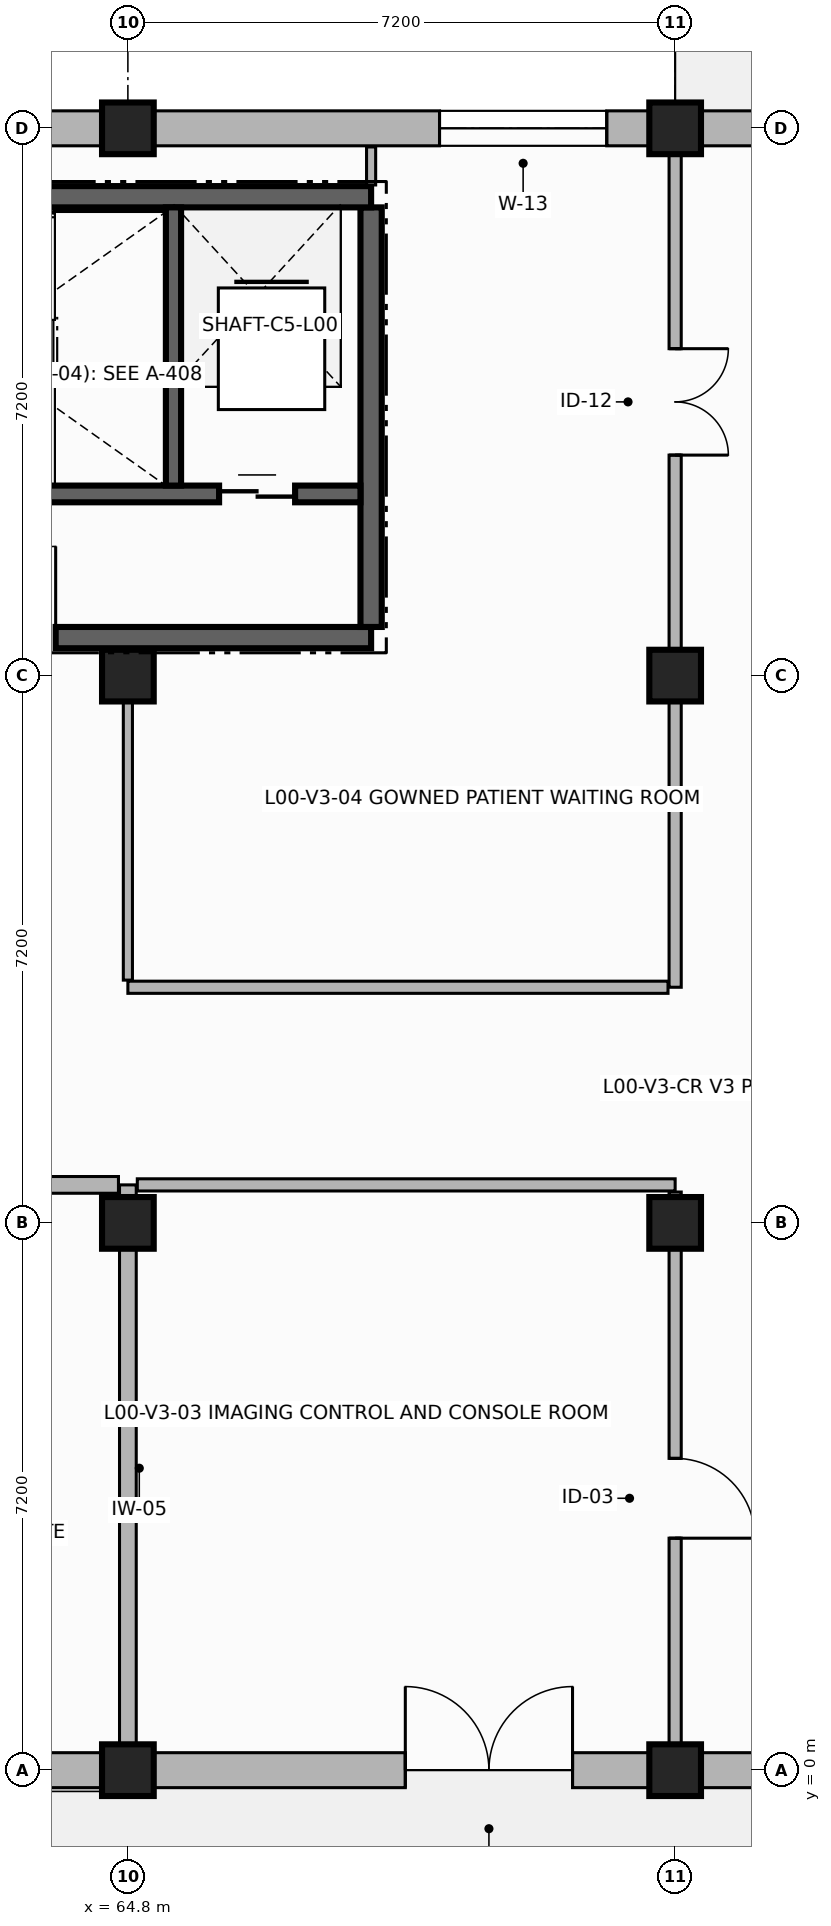
"""IFC4 building model, lengths in metres.
Left out: names, types, materials, properties, quantities, classifications, styles, units other than length and angle.
Written with IfcOpenShell. Run it as: python <this file> out.ifc"""

import sys

from ifc_helpers import new_model, si_unit, direction, frame, frame_2d, origin, origin_2d, place, context, subcontext, project, spatial, rectangle, extrude, element, fill, save


model = new_model("IFC4")
c1 = context("Model", 3, precision=1e-05, world=origin(), true_north=direction((0.0, 1.0)))
c2 = subcontext(c1, "Body", "Model", "MODEL_VIEW")
j1 = project(units=[si_unit("LENGTHUNIT", "METRE"), si_unit("PLANEANGLEUNIT", "RADIAN")], contexts=[c1])
p1 = place(None, origin())
s1 = spatial("IfcSite", under=j1, at=p1, CompositionType="ELEMENT")
p2 = place(p1, origin())
s2 = spatial("IfcBuilding", under=s1, at=p2, CompositionType="ELEMENT")
p3 = place(p2, origin())
s3 = spatial("IfcBuildingStorey", under=s2, at=p3, CompositionType="ELEMENT", Elevation=0.0)
for number, where, z_axis, x_axis in (
    (1, (64.8, 0.0, 0.0), (0.0, 0.0, 1.0), (1.0, 0.0, 0.0)),
    (2, (64.8, 7.2, 0.0), (0.0, 0.0, 1.0), (1.0, 0.0, 0.0)),
    (3, (64.8, 14.4, 0.0), (0.0, 0.0, 1.0), (1.0, 0.0, 0.0)),
    (4, (64.8, 21.6, 0.0), (0.0, 0.0, 1.0), (1.0, 0.0, 0.0)),
    (5, (72.0, 0.0, 0.0), (0.0, 0.0, 1.0), (1.0, 0.0, 0.0)),
    (6, (72.0, 7.2, 0.0), (0.0, 0.0, 1.0), (1.0, 0.0, 0.0)),
    (7, (72.0, 14.4, 0.0), (0.0, 0.0, 1.0), (1.0, 0.0, 0.0)),
    (8, (72.0, 21.6, 0.0), (0.0, 0.0, 1.0), (1.0, 0.0, 0.0)),
):
    element("IfcColumn", number, at=place(p3, frame(where, z_axis=z_axis, x_axis=x_axis)), inside=s3, PredefinedType="COLUMN", context=c2, shape_type="SweptSolid", body=[
        extrude(rectangle(XDim=0.68, YDim=0.68, at=origin_2d()), origin(), (0.0, 0.0, 1.0), 4.15),
    ])
p4 = place(p3, frame((57.6, 0.0, 0.0), z_axis=(0.0, 0.0, 1.0), x_axis=(1.0, 0.0, 0.0)))
e9 = element("IfcWall", 9, at=p4, inside=s3, PredefinedType="SOLIDWALL", context=c2, shape_type="SweptSolid", body=[
    extrude(rectangle(XDim=7.2, YDim=0.46, at=frame_2d((3.6, 0.0))), origin(), (0.0, 0.0, 1.0), 3.43),
])
p5 = place(p4, frame((2.8, 0.0, 1.2)))
e10 = element("IfcOpeningElement", 10, at=p5, cuts=e9, PredefinedType="OPENING", context=c2, shape_type="SweptSolid", body=[
    extrude(rectangle(XDim=1.6, YDim=1.4, at=frame_2d((0.8, 0.7))), frame((0.0, 0.24, 0.0), z_axis=(0.0, -1.0, 0.0), x_axis=(1.0, 0.0, 0.0)), (0.0, 0.0, 1.0), 0.48),
])
p6 = place(p3, frame((64.8, 0.0, 0.0), z_axis=(0.0, 0.0, 1.0), x_axis=(1.0, 0.0, 0.0)))
e11 = element("IfcWall", 11, at=p6, inside=s3, PredefinedType="SOLIDWALL", context=c2, shape_type="SweptSolid", body=[
    extrude(rectangle(XDim=7.2, YDim=0.46, at=frame_2d((3.6, 0.0))), origin(), (0.0, 0.0, 1.0), 3.43),
])
p7 = place(p6, frame((3.65, 0.0, 0.0)))
e12 = element("IfcOpeningElement", 12, at=p7, cuts=e11, PredefinedType="OPENING", context=c2, shape_type="SweptSolid", body=[
    extrude(rectangle(XDim=2.2, YDim=2.6, at=frame_2d((1.1, 1.3))), frame((0.0, 0.24, 0.0), z_axis=(0.0, -1.0, 0.0), x_axis=(1.0, 0.0, 0.0)), (0.0, 0.0, 1.0), 0.48),
])
p8 = place(p3, frame((72.0, 0.0, 0.0), z_axis=(0.0, 0.0, 1.0), x_axis=(1.0, 0.0, 0.0)))
e13 = element("IfcWall", 13, at=p8, inside=s3, PredefinedType="SOLIDWALL", context=c2, shape_type="SweptSolid", body=[
    extrude(rectangle(XDim=7.2, YDim=0.46, at=frame_2d((3.6, 0.0))), origin(), (0.0, 0.0, 1.0), 3.43),
])
p9 = place(p8, frame((1.35, 0.0, 0.0)))
e14 = element("IfcOpeningElement", 14, at=p9, cuts=e13, PredefinedType="OPENING", context=c2, shape_type="SweptSolid", body=[
    extrude(rectangle(XDim=2.0, YDim=2.5, at=frame_2d((1.0, 1.25))), frame((0.0, 0.24, 0.0), z_axis=(0.0, -1.0, 0.0), x_axis=(1.0, 0.0, 0.0)), (0.0, 0.0, 1.0), 0.48),
])
p10 = place(p3, frame((79.2, 21.6, 0.0), z_axis=(0.0, 0.0, 1.0), x_axis=(-1.0, 0.0, 0.0)))
e15 = element("IfcWall", 15, at=p10, inside=s3, PredefinedType="SOLIDWALL", context=c2, shape_type="SweptSolid", body=[
    extrude(rectangle(XDim=7.2, YDim=0.46, at=frame_2d((3.6, 0.0))), origin(), (0.0, 0.0, 1.0), 3.43),
])
p11 = place(p10, frame((4.15, 0.0, 0.0)))
e16 = element("IfcOpeningElement", 16, at=p11, cuts=e15, PredefinedType="OPENING", context=c2, shape_type="SweptSolid", body=[
    extrude(rectangle(XDim=1.7, YDim=2.45, at=frame_2d((0.85, 1.225))), frame((0.0, 0.24, 0.0), z_axis=(0.0, -1.0, 0.0), x_axis=(1.0, 0.0, 0.0)), (0.0, 0.0, 1.0), 0.48),
])
p12 = place(p3, frame((72.0, 21.6, 0.0), z_axis=(0.0, 0.0, 1.0), x_axis=(-1.0, 0.0, 0.0)))
e17 = element("IfcWall", 17, at=p12, inside=s3, PredefinedType="SOLIDWALL", context=c2, shape_type="SweptSolid", body=[
    extrude(rectangle(XDim=7.2, YDim=0.46, at=frame_2d((3.6, 0.0))), origin(), (0.0, 0.0, 1.0), 3.43),
])
p13 = place(p12, frame((0.9, 0.0, 1.2)))
e18 = element("IfcOpeningElement", 18, at=p13, cuts=e17, PredefinedType="OPENING", context=c2, shape_type="SweptSolid", body=[
    extrude(rectangle(XDim=2.2, YDim=1.1, at=frame_2d((1.1, 0.55))), frame((0.0, 0.24, 0.0), z_axis=(0.0, -1.0, 0.0), x_axis=(1.0, 0.0, 0.0)), (0.0, 0.0, 1.0), 0.48),
])
p14 = place(p3, frame((64.8, 21.6, 0.0), z_axis=(0.0, 0.0, 1.0), x_axis=(-1.0, 0.0, 0.0)))
e19 = element("IfcWall", 19, at=p14, inside=s3, PredefinedType="SOLIDWALL", context=c2, shape_type="SweptSolid", body=[
    extrude(rectangle(XDim=7.2, YDim=0.46, at=frame_2d((3.6, 0.0))), origin(), (0.0, 0.0, 1.0), 3.43),
])
p15 = place(p14, frame((2.5, 0.0, 1.2)))
e20 = element("IfcOpeningElement", 20, at=p15, cuts=e19, PredefinedType="OPENING", context=c2, shape_type="SweptSolid", body=[
    extrude(rectangle(XDim=2.2, YDim=1.1, at=frame_2d((1.1, 0.55))), frame((0.0, 0.24, 0.0), z_axis=(0.0, -1.0, 0.0), x_axis=(1.0, 0.0, 0.0)), (0.0, 0.0, 1.0), 0.48),
])
p16 = place(p3, frame((58.5, 14.9, 0.0), z_axis=(0.0, 0.0, 1.0), x_axis=(1.0, 0.0, 0.0)))
e21 = element("IfcWall", 21, at=p16, inside=s3, PredefinedType="SHEAR", context=c2, shape_type="SweptSolid", body=[
    extrude(rectangle(XDim=9.5, YDim=0.28, at=frame_2d((4.75, 0.0))), origin(), (0.0, 0.0, 1.0), 4.15),
])
p17 = place(p16, frame((4.15, 0.0, 0.0)))
e22 = element("IfcOpeningElement", 22, at=p17, cuts=e21, PredefinedType="OPENING", context=c2, shape_type="SweptSolid", body=[
    extrude(rectangle(XDim=1.2, YDim=2.25, at=frame_2d((0.6, 1.125))), frame((0.0, 0.15, 0.0), z_axis=(0.0, -1.0, 0.0), x_axis=(1.0, 0.0, 0.0)), (0.0, 0.0, 1.0), 0.3),
])
p18 = place(p3, frame((68.0, 15.04, 0.0), z_axis=(0.0, 0.0, 1.0), x_axis=(0.0, 1.0, 0.0)))
e23 = element("IfcWall", 23, at=p18, inside=s3, PredefinedType="SHEAR", context=c2, shape_type="SweptSolid", body=[
    extrude(rectangle(XDim=5.52, YDim=0.28, at=frame_2d((2.76, 0.0))), origin(), (0.0, 0.0, 1.0), 4.15),
])
p19 = place(p3, frame((68.0, 20.7, 0.0), z_axis=(0.0, 0.0, 1.0), x_axis=(-1.0, 0.0, 0.0)))
e24 = element("IfcWall", 24, at=p19, inside=s3, PredefinedType="SHEAR", context=c2, shape_type="SweptSolid", body=[
    extrude(rectangle(XDim=9.5, YDim=0.28, at=frame_2d((4.75, 0.0))), origin(), (0.0, 0.0, 1.0), 4.15),
])
p20 = place(p3, frame((58.64, 16.79, 0.0), z_axis=(0.0, 0.0, 1.0), x_axis=(1.0, 0.0, 0.0)))
e25 = element("IfcWall", 25, at=p20, inside=s3, PredefinedType="SHEAR", context=c2, shape_type="SweptSolid", body=[
    extrude(rectangle(XDim=9.22, YDim=0.22, at=frame_2d((4.61, 0.0))), origin(), (0.0, 0.0, 1.0), 4.15),
])
p21 = place(p20, frame((0.31, 0.0, 0.0)))
e26 = element("IfcOpeningElement", 26, at=p21, cuts=e25, PredefinedType="OPENING", context=c2, shape_type="SweptSolid", body=[
    extrude(rectangle(XDim=1.1, YDim=2.15, at=frame_2d((0.55, 1.075))), frame((0.0, 0.12, 0.0), z_axis=(0.0, -1.0, 0.0), x_axis=(1.0, 0.0, 0.0)), (0.0, 0.0, 1.0), 0.24),
])
p22 = place(p20, frame((7.36, 0.0, 0.0)))
e27 = element("IfcOpeningElement", 27, at=p22, cuts=e25, PredefinedType="OPENING", context=c2, shape_type="SweptSolid", body=[
    extrude(rectangle(XDim=1.0, YDim=2.2, at=frame_2d((0.5, 1.1))), frame((0.0, 0.12, 0.0), z_axis=(0.0, -1.0, 0.0), x_axis=(1.0, 0.0, 0.0)), (0.0, 0.0, 1.0), 0.24),
])
p23 = place(p3, frame((65.4, 16.9, 0.0), z_axis=(0.0, 0.0, 1.0), x_axis=(0.0, 1.0, 0.0)))
e28 = element("IfcWall", 28, at=p23, inside=s3, PredefinedType="SHEAR", context=c2, shape_type="SweptSolid", body=[
    extrude(rectangle(XDim=3.66, YDim=0.2, at=frame_2d((1.83, 0.0))), origin(), (0.0, 0.0, 1.0), 4.15),
])
p24 = place(p3, frame((64.8, 7.7, 0.0), z_axis=(0.0, 0.0, 1.0), x_axis=(0.0, -1.0, 0.0)))
e29 = element("IfcWall", 29, at=p24, inside=s3, PredefinedType="SOLIDWALL", context=c2, shape_type="SweptSolid", body=[
    extrude(rectangle(XDim=7.455, YDim=0.22, at=frame_2d((3.728, 0.0))), origin(), (0.0, 0.0, 1.0), 3.41),
])
p25 = place(p3, frame((57.845, 7.7, 0.0), z_axis=(0.0, 0.0, 1.0), x_axis=(1.0, 0.0, 0.0)))
e30 = element("IfcWall", 30, at=p25, inside=s3, PredefinedType="SOLIDWALL", context=c2, shape_type="SweptSolid", body=[
    extrude(rectangle(XDim=6.831, YDim=0.22, at=frame_2d((3.416, 0.0))), origin(), (0.0, 0.0, 1.0), 3.41),
])
p26 = place(p25, frame((2.503, 0.0, 0.0)))
e31 = element("IfcOpeningElement", 31, at=p26, cuts=e30, PredefinedType="OPENING", context=c2, shape_type="SweptSolid", body=[
    extrude(rectangle(XDim=1.6, YDim=2.3, at=frame_2d((0.8, 1.15))), frame((0.0, 0.12, 0.0), z_axis=(0.0, -1.0, 0.0), x_axis=(1.0, 0.0, 0.0)), (0.0, 0.0, 1.0), 0.24),
])
p27 = place(p3, frame((64.924, 7.7, 0.0), z_axis=(0.0, 0.0, 1.0), x_axis=(1.0, 0.0, 0.0)))
e32 = element("IfcWall", 32, at=p27, inside=s3, PredefinedType="PARTITIONING", context=c2, shape_type="SweptSolid", body=[
    extrude(rectangle(XDim=7.076, YDim=0.16, at=frame_2d((3.538, 0.0))), origin(), (0.0, 0.0, 1.0), 3.41),
])
p28 = place(p3, frame((72.0, 7.606, 0.0), z_axis=(0.0, 0.0, 1.0), x_axis=(0.0, -1.0, 0.0)))
e33 = element("IfcWall", 33, at=p28, inside=s3, PredefinedType="PARTITIONING", context=c2, shape_type="SweptSolid", body=[
    extrude(rectangle(XDim=7.361, YDim=0.16, at=frame_2d((3.68, 0.0))), origin(), (0.0, 0.0, 1.0), 3.41),
])
p29 = place(p28, frame((3.504, 0.0, 0.0)))
e34 = element("IfcOpeningElement", 34, at=p29, cuts=e33, PredefinedType="OPENING", context=c2, shape_type="SweptSolid", body=[
    extrude(rectangle(XDim=1.05, YDim=2.15, at=frame_2d((0.525, 1.075))), frame((0.0, 0.09, 0.0), z_axis=(0.0, -1.0, 0.0), x_axis=(1.0, 0.0, 0.0)), (0.0, 0.0, 1.0), 0.18),
])
p30 = place(p3, frame((72.0, 21.355, 0.0), z_axis=(0.0, 0.0, 1.0), x_axis=(0.0, -1.0, 0.0)))
e35 = element("IfcWall", 35, at=p30, inside=s3, PredefinedType="PARTITIONING", context=c2, shape_type="SweptSolid", body=[
    extrude(rectangle(XDim=11.055, YDim=0.16, at=frame_2d((5.527, 0.0))), origin(), (0.0, 0.0, 1.0), 3.41),
])
p31 = place(p30, frame((2.654, 0.0, 0.0)))
e36 = element("IfcOpeningElement", 36, at=p31, cuts=e35, PredefinedType="OPENING", context=c2, shape_type="SweptSolid", body=[
    extrude(rectangle(XDim=1.4, YDim=2.3, at=frame_2d((0.7, 1.15))), frame((0.0, 0.09, 0.0), z_axis=(0.0, -1.0, 0.0), x_axis=(1.0, 0.0, 0.0)), (0.0, 0.0, 1.0), 0.18),
])
p32 = place(p3, frame((71.906, 10.3, 0.0), z_axis=(0.0, 0.0, 1.0), x_axis=(-1.0, 0.0, 0.0)))
e37 = element("IfcWall", 37, at=p32, inside=s3, PredefinedType="PARTITIONING", context=c2, shape_type="SweptSolid", body=[
    extrude(rectangle(XDim=7.106, YDim=0.16, at=frame_2d((3.553, 0.0))), origin(), (0.0, 0.0, 1.0), 3.41),
])
p33 = place(p3, frame((64.8, 10.394, 0.0), z_axis=(0.0, 0.0, 1.0), x_axis=(0.0, 1.0, 0.0)))
e38 = element("IfcWall", 38, at=p33, inside=s3, PredefinedType="PARTITIONING", context=c2, shape_type="SweptSolid", body=[
    extrude(rectangle(XDim=4.351, YDim=0.12, at=frame_2d((2.176, 0.0))), origin(), (0.0, 0.0, 1.0), 3.41),
])
p34 = place(p3, frame((68.0, 20.855, 0.0), z_axis=(0.0, 0.0, 1.0), x_axis=(0.0, 1.0, 0.0)))
e39 = element("IfcWall", 39, at=p34, inside=s3, PredefinedType="PARTITIONING", context=c2, shape_type="SweptSolid", body=[
    extrude(rectangle(XDim=0.5, YDim=0.12, at=frame_2d((0.25, 0.0))), origin(), (0.0, 0.0, 1.0), 3.41),
])
p35 = place(p7, origin())
e40 = element("IfcDoor", 40, at=p35, inside=s3, OperationType="DOUBLE_DOOR_SINGLE_SWING", PredefinedType="DOOR", context=c2, shape_type="SweptSolid", body=[
    extrude(rectangle(XDim=2.2, YDim=2.6, at=frame_2d((1.1, 1.3))), frame((0.0, 0.025, 0.0), z_axis=(0.0, -1.0, 0.0), x_axis=(1.0, 0.0, 0.0)), (0.0, 0.0, 1.0), 0.05),
])
fill(e12, e40)
p36 = place(p13, origin())
e41 = element("IfcWindow", 41, at=p36, inside=s3, PartitioningType="SINGLE_PANEL", PredefinedType="WINDOW", context=c2, shape_type="SweptSolid", body=[
    extrude(rectangle(XDim=2.2, YDim=1.1, at=frame_2d((1.1, 0.55))), frame((0.0, 0.03, 0.0), z_axis=(0.0, -1.0, 0.0), x_axis=(1.0, 0.0, 0.0)), (0.0, 0.0, 1.0), 0.06),
])
fill(e18, e41)
p37 = place(p22, origin())
e42 = element("IfcDoor", 42, at=p37, inside=s3, OperationType="DOUBLE_DOOR_SLIDING", PredefinedType="DOOR", context=c2, shape_type="SweptSolid", body=[
    extrude(rectangle(XDim=1.0, YDim=2.2, at=frame_2d((0.5, 1.1))), frame((0.0, 0.025, 0.0), z_axis=(0.0, -1.0, 0.0), x_axis=(1.0, 0.0, 0.0)), (0.0, 0.0, 1.0), 0.05),
])
fill(e27, e42)
p38 = place(p17, origin())
e43 = element("IfcDoor", 43, at=p38, inside=s3, OperationType="SINGLE_SWING_RIGHT", PredefinedType="DOOR", context=c2, shape_type="SweptSolid", body=[
    extrude(rectangle(XDim=1.2, YDim=2.25, at=frame_2d((0.6, 1.125))), frame((0.0, 0.025, 0.0), z_axis=(0.0, -1.0, 0.0), x_axis=(1.0, 0.0, 0.0)), (0.0, 0.0, 1.0), 0.05),
])
fill(e22, e43)
p39 = place(p29, origin())
e44 = element("IfcDoor", 44, at=p39, inside=s3, OperationType="SINGLE_SWING_RIGHT", PredefinedType="DOOR", context=c2, shape_type="SweptSolid", body=[
    extrude(rectangle(XDim=1.05, YDim=2.15, at=frame_2d((0.525, 1.075))), frame((0.0, 0.025, 0.0), z_axis=(0.0, -1.0, 0.0), x_axis=(1.0, 0.0, 0.0)), (0.0, 0.0, 1.0), 0.05),
])
fill(e34, e44)
p40 = place(p31, origin())
e45 = element("IfcDoor", 45, at=p40, inside=s3, OperationType="DOUBLE_DOOR_SINGLE_SWING", PredefinedType="DOOR", context=c2, shape_type="SweptSolid", body=[
    extrude(rectangle(XDim=1.4, YDim=2.3, at=frame_2d((0.7, 1.15))), frame((0.0, 0.025, 0.0), z_axis=(0.0, -1.0, 0.0), x_axis=(1.0, 0.0, 0.0)), (0.0, 0.0, 1.0), 0.05),
])
fill(e36, e45)
save(model, sys.argv[1])
